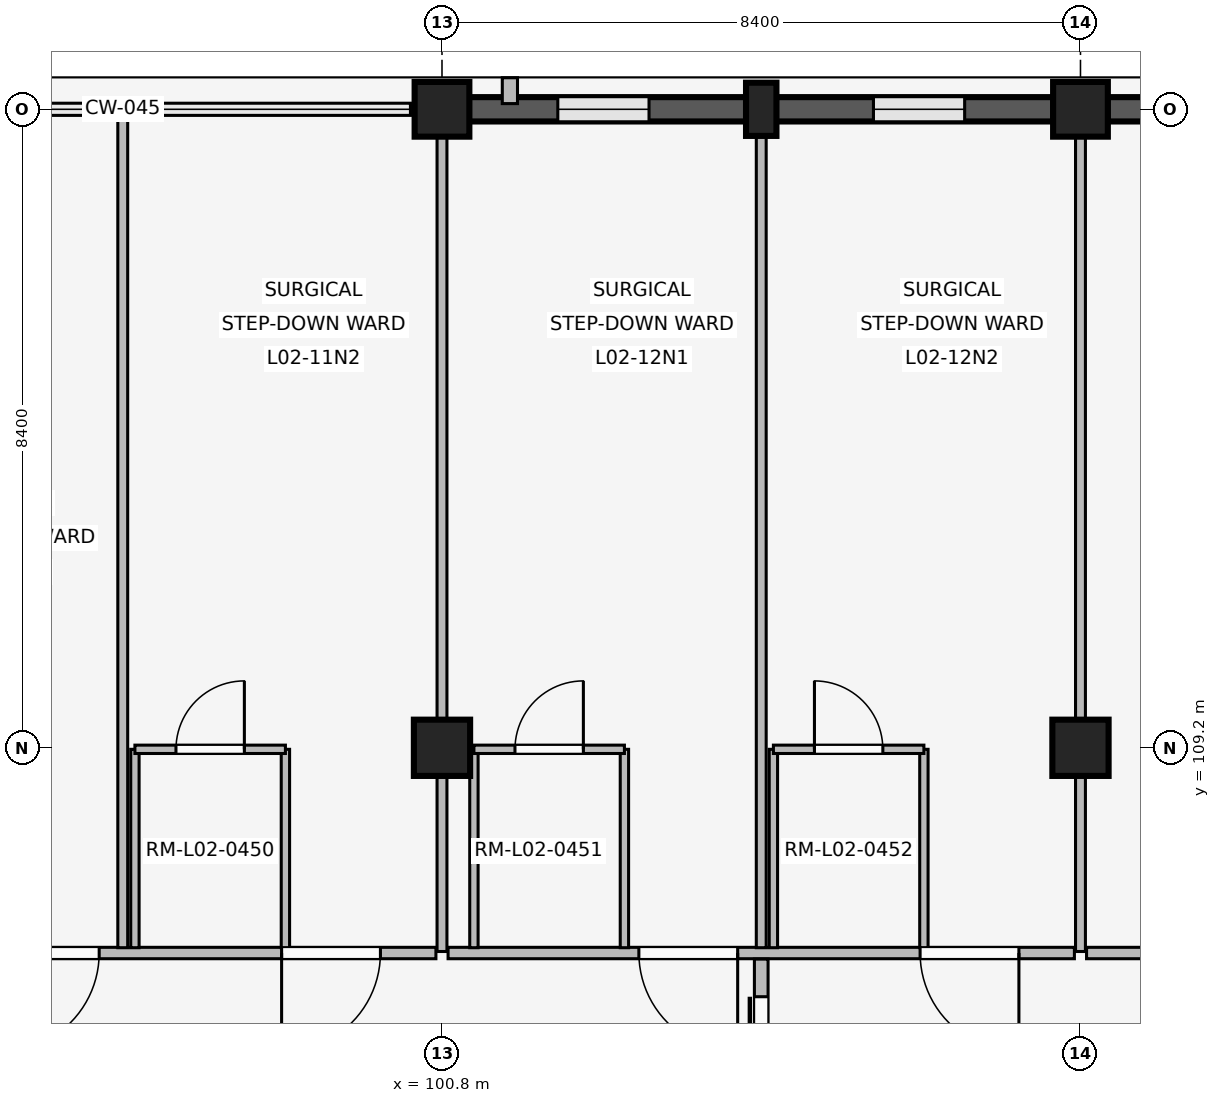
"""IFC4 building model, lengths in metres.
Left out: names, types, materials, properties, quantities, classifications, styles, units other than length and angle.
Written with IfcOpenShell. Run it as: python <this file> out.ifc"""

import sys

from ifc_helpers import new_model, si_unit, direction, frame, frame_2d, origin, origin_2d, place, context, subcontext, project, spatial, rectangle, extrude, element, fill, save


model = new_model("IFC4")
c1 = context("Model", 3, precision=1e-05, world=origin(), true_north=direction((0.0, 1.0)))
c2 = subcontext(c1, "Body", "Model", "MODEL_VIEW")
j1 = project(units=[si_unit("LENGTHUNIT", "METRE"), si_unit("PLANEANGLEUNIT", "RADIAN")], contexts=[c1])
p1 = place(None, origin())
s1 = spatial("IfcSite", under=j1, at=p1, CompositionType="ELEMENT")
p2 = place(p1, origin())
s2 = spatial("IfcBuilding", under=s1, at=p2, CompositionType="ELEMENT")
p3 = place(p2, frame((0.0, 0.0, 8.1)))
s3 = spatial("IfcBuildingStorey", under=s2, at=p3, CompositionType="ELEMENT", Elevation=8.1)
p4 = place(p3, frame((100.8, 109.2, 0.0), z_axis=(0.0, 0.0, 1.0), x_axis=(1.0, 0.0, 0.0)))
e1 = element("IfcColumn", 1, at=p4, inside=s3, PredefinedType="COLUMN", context=c2, shape_type="SweptSolid", body=[
    extrude(rectangle(XDim=0.74, YDim=0.74, at=origin_2d()), origin(), (0.0, 0.0, 1.0), 4.8),
])
p5 = place(p3, frame((100.8, 117.6, 0.0), z_axis=(0.0, 0.0, 1.0), x_axis=(1.0, 0.0, 0.0)))
e2 = element("IfcColumn", 2, at=p5, inside=s3, PredefinedType="COLUMN", context=c2, shape_type="SweptSolid", body=[
    extrude(rectangle(XDim=0.72, YDim=0.72, at=origin_2d()), origin(), (0.0, 0.0, 1.0), 4.8),
])
p6 = place(p3, frame((109.2, 109.2, 0.0), z_axis=(0.0, 0.0, 1.0), x_axis=(1.0, 0.0, 0.0)))
e3 = element("IfcColumn", 3, at=p6, inside=s3, PredefinedType="COLUMN", context=c2, shape_type="SweptSolid", body=[
    extrude(rectangle(XDim=0.74, YDim=0.74, at=origin_2d()), origin(), (0.0, 0.0, 1.0), 4.8),
])
p7 = place(p3, frame((109.2, 117.6, 0.0), z_axis=(0.0, 0.0, 1.0), x_axis=(1.0, 0.0, 0.0)))
e4 = element("IfcColumn", 4, at=p7, inside=s3, PredefinedType="COLUMN", context=c2, shape_type="SweptSolid", body=[
    extrude(rectangle(XDim=0.72, YDim=0.72, at=origin_2d()), origin(), (0.0, 0.0, 1.0), 4.8),
])
p8 = place(p3, frame((105.0, 117.6, 0.0), z_axis=(0.0, 0.0, 1.0), x_axis=(1.0, 0.0, 0.0)))
e5 = element("IfcColumn", 5, at=p8, inside=s3, PredefinedType="PILASTER", context=c2, shape_type="SweptSolid", body=[
    extrude(rectangle(XDim=0.4, YDim=0.7, at=origin_2d()), origin(), (0.0, 0.0, 1.0), 4.8),
])
p9 = place(p3, frame((101.155, 117.6, 0.0), z_axis=(0.0, 0.0, 1.0), x_axis=(1.0, 0.0, 0.0)))
e6 = element("IfcWall", 6, at=p9, inside=s3, PredefinedType="SOLIDWALL", context=c2, shape_type="SweptSolid", body=[
    extrude(rectangle(XDim=7.69, YDim=0.32, at=frame_2d((3.845, 0.0))), origin(), (0.0, 0.0, 1.0), 3.86),
])
p10 = place(p9, frame((1.169, 0.0, 0.85)))
e7 = element("IfcOpeningElement", 7, at=p10, cuts=e6, PredefinedType="OPENING", context=c2, shape_type="SweptSolid", body=[
    extrude(rectangle(XDim=1.2, YDim=1.55, at=frame_2d((0.6, 0.775))), frame((0.0, 0.17, 0.0), z_axis=(0.0, -1.0, 0.0), x_axis=(1.0, 0.0, 0.0)), (0.0, 0.0, 1.0), 0.34),
])
p11 = place(p9, frame((5.321, 0.0, 0.85)))
e8 = element("IfcOpeningElement", 8, at=p11, cuts=e6, PredefinedType="OPENING", context=c2, shape_type="SweptSolid", body=[
    extrude(rectangle(XDim=1.2, YDim=1.55, at=frame_2d((0.6, 0.775))), frame((0.0, 0.17, 0.0), z_axis=(0.0, -1.0, 0.0), x_axis=(1.0, 0.0, 0.0)), (0.0, 0.0, 1.0), 0.34),
])
p12 = place(p3, frame((101.693, 117.675, 0.0), z_axis=(0.0, 0.0, 1.0), x_axis=(0.0, 1.0, 0.0)))
e9 = element("IfcWall", 9, at=p12, inside=s3, PredefinedType="ELEMENTEDWALL", context=c2, shape_type="SweptSolid", body=[
    extrude(rectangle(XDim=0.34, YDim=0.2, at=frame_2d((0.17, 0.0))), origin(), (0.0, 0.0, 1.0), 3.84),
])
p13 = place(p3, frame((109.555, 117.6, 0.0), z_axis=(0.0, 0.0, 1.0), x_axis=(1.0, 0.0, 0.0)))
e10 = element("IfcWall", 10, at=p13, inside=s3, PredefinedType="SOLIDWALL", context=c2, shape_type="SweptSolid", body=[
    extrude(rectangle(XDim=7.69, YDim=0.32, at=frame_2d((3.845, 0.0))), origin(), (0.0, 0.0, 1.0), 3.86),
])
p14 = place(p13, frame((1.394, 0.0, 0.85)))
e11 = element("IfcOpeningElement", 11, at=p14, cuts=e10, PredefinedType="OPENING", context=c2, shape_type="SweptSolid", body=[
    extrude(rectangle(XDim=0.75, YDim=1.85, at=frame_2d((0.375, 0.925))), frame((0.0, 0.17, 0.0), z_axis=(0.0, -1.0, 0.0), x_axis=(1.0, 0.0, 0.0)), (0.0, 0.0, 1.0), 0.34),
])
p15 = place(p13, frame((5.546, 0.0, 0.85)))
e12 = element("IfcOpeningElement", 12, at=p15, cuts=e10, PredefinedType="OPENING", context=c2, shape_type="SweptSolid", body=[
    extrude(rectangle(XDim=0.75, YDim=1.85, at=frame_2d((0.375, 0.925))), frame((0.0, 0.17, 0.0), z_axis=(0.0, -1.0, 0.0), x_axis=(1.0, 0.0, 0.0)), (0.0, 0.0, 1.0), 0.34),
])
p16 = place(p3, frame((100.72, 106.5, 0.0), z_axis=(0.0, 0.0, 1.0), x_axis=(-1.0, 0.0, 0.0)))
e13 = element("IfcWall", 13, at=p16, inside=s3, PredefinedType="PARTITIONING", context=c2, shape_type="SweptSolid", body=[
    extrude(rectangle(XDim=7.96, YDim=0.15, at=frame_2d((3.98, 0.0))), origin(), (0.0, 0.0, 1.0), 3.84),
])
p17 = place(p16, frame((0.73, 0.0, 0.0)))
e14 = element("IfcOpeningElement", 14, at=p17, cuts=e13, PredefinedType="OPENING", context=c2, shape_type="SweptSolid", body=[
    extrude(rectangle(XDim=1.3, YDim=2.25, at=frame_2d((0.65, 1.125))), frame((0.0, 0.085, 0.0), z_axis=(0.0, -1.0, 0.0), x_axis=(1.0, 0.0, 0.0)), (0.0, 0.0, 1.0), 0.17),
])
p18 = place(p16, frame((4.43, 0.0, 0.0)))
e15 = element("IfcOpeningElement", 15, at=p18, cuts=e13, PredefinedType="OPENING", context=c2, shape_type="SweptSolid", body=[
    extrude(rectangle(XDim=1.3, YDim=2.25, at=frame_2d((0.65, 1.125))), frame((0.0, 0.085, 0.0), z_axis=(0.0, -1.0, 0.0), x_axis=(1.0, 0.0, 0.0)), (0.0, 0.0, 1.0), 0.17),
])
p19 = place(p3, frame((96.6, 106.57, 0.0), z_axis=(0.0, 0.0, 1.0), x_axis=(0.0, 1.0, 0.0)))
e16 = element("IfcWall", 16, at=p19, inside=s3, PredefinedType="PARTITIONING", context=c2, shape_type="SweptSolid", body=[
    extrude(rectangle(XDim=10.93, YDim=0.13, at=frame_2d((5.465, 0.0))), origin(), (0.0, 0.0, 1.0), 3.84),
])
for number, where, z_axis, x_axis in (
    (17, (96.76, 106.57, 0.0), (0.0, 0.0, 1.0), (0.0, 1.0, 0.0)),
    (18, (98.74, 106.57, 0.0), (0.0, 0.0, 1.0), (0.0, 1.0, 0.0)),
):
    element("IfcWall", number, at=place(p3, frame(where, z_axis=z_axis, x_axis=x_axis)), inside=s3, PredefinedType="PARTITIONING", context=c2, shape_type="SweptSolid", body=[
        extrude(rectangle(XDim=2.61, YDim=0.11, at=frame_2d((1.305, 0.0))), origin(), (0.0, 0.0, 1.0), 3.84),
    ])
p20 = place(p3, frame((96.76, 109.18, 0.0), z_axis=(0.0, 0.0, 1.0), x_axis=(1.0, 0.0, 0.0)))
e19 = element("IfcWall", 19, at=p20, inside=s3, PredefinedType="PARTITIONING", context=c2, shape_type="SweptSolid", body=[
    extrude(rectangle(XDim=1.98, YDim=0.11, at=frame_2d((0.99, 0.0))), origin(), (0.0, 0.0, 1.0), 3.84),
])
p21 = place(p20, frame((0.54, 0.0, 0.0)))
e20 = element("IfcOpeningElement", 20, at=p21, cuts=e19, PredefinedType="OPENING", context=c2, shape_type="SweptSolid", body=[
    extrude(rectangle(XDim=0.9, YDim=2.1, at=frame_2d((0.45, 1.05))), frame((0.0, 0.065, 0.0), z_axis=(0.0, -1.0, 0.0), x_axis=(1.0, 0.0, 0.0)), (0.0, 0.0, 1.0), 0.13),
])
p22 = place(p3, frame((100.8, 106.52, 0.0), z_axis=(0.0, 0.0, 1.0), x_axis=(0.0, 1.0, 0.0)))
e21 = element("IfcWall", 21, at=p22, inside=s3, PredefinedType="PARTITIONING", context=c2, shape_type="SweptSolid", body=[
    extrude(rectangle(XDim=10.94, YDim=0.13, at=frame_2d((5.47, 0.0))), origin(), (0.0, 0.0, 1.0), 3.84),
])
p23 = place(p3, frame((109.12, 106.5, 0.0), z_axis=(0.0, 0.0, 1.0), x_axis=(-1.0, 0.0, 0.0)))
e22 = element("IfcWall", 22, at=p23, inside=s3, PredefinedType="PARTITIONING", context=c2, shape_type="SweptSolid", body=[
    extrude(rectangle(XDim=8.24, YDim=0.15, at=frame_2d((4.12, 0.0))), origin(), (0.0, 0.0, 1.0), 3.84),
])
p24 = place(p23, frame((0.73, 0.0, 0.0)))
e23 = element("IfcOpeningElement", 23, at=p24, cuts=e22, PredefinedType="OPENING", context=c2, shape_type="SweptSolid", body=[
    extrude(rectangle(XDim=1.3, YDim=2.25, at=frame_2d((0.65, 1.125))), frame((0.0, 0.085, 0.0), z_axis=(0.0, -1.0, 0.0), x_axis=(1.0, 0.0, 0.0)), (0.0, 0.0, 1.0), 0.17),
])
p25 = place(p23, frame((4.43, 0.0, 0.0)))
e24 = element("IfcOpeningElement", 24, at=p25, cuts=e22, PredefinedType="OPENING", context=c2, shape_type="SweptSolid", body=[
    extrude(rectangle(XDim=1.3, YDim=2.25, at=frame_2d((0.65, 1.125))), frame((0.0, 0.085, 0.0), z_axis=(0.0, -1.0, 0.0), x_axis=(1.0, 0.0, 0.0)), (0.0, 0.0, 1.0), 0.17),
])
p26 = place(p3, frame((105.0, 106.57, 0.0), z_axis=(0.0, 0.0, 1.0), x_axis=(0.0, 1.0, 0.0)))
e25 = element("IfcWall", 25, at=p26, inside=s3, PredefinedType="PARTITIONING", context=c2, shape_type="SweptSolid", body=[
    extrude(rectangle(XDim=10.93, YDim=0.13, at=frame_2d((5.465, 0.0))), origin(), (0.0, 0.0, 1.0), 3.84),
])
for number, where, z_axis, x_axis in (
    (26, (101.22, 106.57, 0.0), (0.0, 0.0, 1.0), (0.0, 1.0, 0.0)),
    (27, (103.2, 106.57, 0.0), (0.0, 0.0, 1.0), (0.0, 1.0, 0.0)),
):
    element("IfcWall", number, at=place(p3, frame(where, z_axis=z_axis, x_axis=x_axis)), inside=s3, PredefinedType="PARTITIONING", context=c2, shape_type="SweptSolid", body=[
        extrude(rectangle(XDim=2.61, YDim=0.11, at=frame_2d((1.305, 0.0))), origin(), (0.0, 0.0, 1.0), 3.84),
    ])
p27 = place(p3, frame((101.22, 109.18, 0.0), z_axis=(0.0, 0.0, 1.0), x_axis=(1.0, 0.0, 0.0)))
e28 = element("IfcWall", 28, at=p27, inside=s3, PredefinedType="PARTITIONING", context=c2, shape_type="SweptSolid", body=[
    extrude(rectangle(XDim=1.98, YDim=0.11, at=frame_2d((0.99, 0.0))), origin(), (0.0, 0.0, 1.0), 3.84),
])
p28 = place(p27, frame((0.54, 0.0, 0.0)))
e29 = element("IfcOpeningElement", 29, at=p28, cuts=e28, PredefinedType="OPENING", context=c2, shape_type="SweptSolid", body=[
    extrude(rectangle(XDim=0.9, YDim=2.1, at=frame_2d((0.45, 1.05))), frame((0.0, 0.065, 0.0), z_axis=(0.0, -1.0, 0.0), x_axis=(1.0, 0.0, 0.0)), (0.0, 0.0, 1.0), 0.13),
])
for number, where, z_axis, x_axis in (
    (30, (105.16, 106.57, 0.0), (0.0, 0.0, 1.0), (0.0, 1.0, 0.0)),
    (31, (107.14, 106.57, 0.0), (0.0, 0.0, 1.0), (0.0, 1.0, 0.0)),
):
    element("IfcWall", number, at=place(p3, frame(where, z_axis=z_axis, x_axis=x_axis)), inside=s3, PredefinedType="PARTITIONING", context=c2, shape_type="SweptSolid", body=[
        extrude(rectangle(XDim=2.61, YDim=0.11, at=frame_2d((1.305, 0.0))), origin(), (0.0, 0.0, 1.0), 3.84),
    ])
p29 = place(p3, frame((105.16, 109.18, 0.0), z_axis=(0.0, 0.0, 1.0), x_axis=(1.0, 0.0, 0.0)))
e32 = element("IfcWall", 32, at=p29, inside=s3, PredefinedType="PARTITIONING", context=c2, shape_type="SweptSolid", body=[
    extrude(rectangle(XDim=1.98, YDim=0.11, at=frame_2d((0.99, 0.0))), origin(), (0.0, 0.0, 1.0), 3.84),
])
p30 = place(p29, frame((0.54, 0.0, 0.0)))
e33 = element("IfcOpeningElement", 33, at=p30, cuts=e32, PredefinedType="OPENING", context=c2, shape_type="SweptSolid", body=[
    extrude(rectangle(XDim=0.9, YDim=2.1, at=frame_2d((0.45, 1.05))), frame((0.0, 0.065, 0.0), z_axis=(0.0, -1.0, 0.0), x_axis=(1.0, 0.0, 0.0)), (0.0, 0.0, 1.0), 0.13),
])
p31 = place(p3, frame((105.0, 103.58, 0.0), z_axis=(0.0, 0.0, 1.0), x_axis=(0.0, 1.0, 0.0)))
e34 = element("IfcWall", 34, at=p31, inside=s3, PredefinedType="PARTITIONING", context=c2, shape_type="SweptSolid", body=[
    extrude(rectangle(XDim=2.84, YDim=0.18, at=frame_2d((1.42, 0.0))), origin(), (0.0, 0.0, 1.0), 3.84),
])
p32 = place(p31, frame((0.495, 0.0, 0.0)))
e35 = element("IfcOpeningElement", 35, at=p32, cuts=e34, PredefinedType="OPENING", context=c2, shape_type="SweptSolid", body=[
    extrude(rectangle(XDim=1.85, YDim=2.3, at=frame_2d((0.925, 1.15))), frame((0.0, 0.1, 0.0), z_axis=(0.0, -1.0, 0.0), x_axis=(1.0, 0.0, 0.0)), (0.0, 0.0, 1.0), 0.2),
])
p33 = place(p3, frame((109.2, 106.52, 0.0), z_axis=(0.0, 0.0, 1.0), x_axis=(0.0, 1.0, 0.0)))
e36 = element("IfcWall", 36, at=p33, inside=s3, PredefinedType="PARTITIONING", context=c2, shape_type="SweptSolid", body=[
    extrude(rectangle(XDim=10.94, YDim=0.13, at=frame_2d((5.47, 0.0))), origin(), (0.0, 0.0, 1.0), 3.84),
])
p34 = place(p3, frame((117.52, 106.5, 0.0), z_axis=(0.0, 0.0, 1.0), x_axis=(-1.0, 0.0, 0.0)))
e37 = element("IfcWall", 37, at=p34, inside=s3, PredefinedType="PARTITIONING", context=c2, shape_type="SweptSolid", body=[
    extrude(rectangle(XDim=8.24, YDim=0.15, at=frame_2d((4.12, 0.0))), origin(), (0.0, 0.0, 1.0), 3.84),
])
p35 = place(p34, frame((3.37, 0.0, 0.0)))
e38 = element("IfcOpeningElement", 38, at=p35, cuts=e37, PredefinedType="OPENING", context=c2, shape_type="SweptSolid", body=[
    extrude(rectangle(XDim=1.5, YDim=2.3, at=frame_2d((0.75, 1.15))), frame((0.0, 0.085, 0.0), z_axis=(0.0, -1.0, 0.0), x_axis=(1.0, 0.0, 0.0)), (0.0, 0.0, 1.0), 0.17),
])
p36 = place(p10, origin())
e39 = element("IfcWindow", 39, at=p36, inside=s3, PartitioningType="SINGLE_PANEL", PredefinedType="WINDOW", context=c2, shape_type="SweptSolid", body=[
    extrude(rectangle(XDim=1.2, YDim=1.55, at=frame_2d((0.6, 0.775))), frame((0.0, 0.03, 0.0), z_axis=(0.0, -1.0, 0.0), x_axis=(1.0, 0.0, 0.0)), (0.0, 0.0, 1.0), 0.06),
])
fill(e7, e39)
p37 = place(p11, origin())
e40 = element("IfcWindow", 40, at=p37, inside=s3, PartitioningType="SINGLE_PANEL", PredefinedType="WINDOW", context=c2, shape_type="SweptSolid", body=[
    extrude(rectangle(XDim=1.2, YDim=1.55, at=frame_2d((0.6, 0.775))), frame((0.0, 0.03, 0.0), z_axis=(0.0, -1.0, 0.0), x_axis=(1.0, 0.0, 0.0)), (0.0, 0.0, 1.0), 0.06),
])
fill(e8, e40)
p38 = place(p17, origin())
e41 = element("IfcDoor", 41, at=p38, inside=s3, OperationType="SINGLE_SWING_RIGHT", PredefinedType="DOOR", context=c2, shape_type="SweptSolid", body=[
    extrude(rectangle(XDim=1.3, YDim=2.25, at=frame_2d((0.65, 1.125))), frame((0.0, 0.025, 0.0), z_axis=(0.0, -1.0, 0.0), x_axis=(1.0, 0.0, 0.0)), (0.0, 0.0, 1.0), 0.05),
])
fill(e14, e41)
p39 = place(p18, origin())
e42 = element("IfcDoor", 42, at=p39, inside=s3, OperationType="SINGLE_SWING_RIGHT", PredefinedType="DOOR", context=c2, shape_type="SweptSolid", body=[
    extrude(rectangle(XDim=1.3, YDim=2.25, at=frame_2d((0.65, 1.125))), frame((0.0, 0.025, 0.0), z_axis=(0.0, -1.0, 0.0), x_axis=(1.0, 0.0, 0.0)), (0.0, 0.0, 1.0), 0.05),
])
fill(e15, e42)
p40 = place(p21, origin())
e43 = element("IfcDoor", 43, at=p40, inside=s3, OperationType="SINGLE_SWING_RIGHT", PredefinedType="DOOR", context=c2, shape_type="SweptSolid", body=[
    extrude(rectangle(XDim=0.9, YDim=2.1, at=frame_2d((0.45, 1.05))), frame((0.0, 0.025, 0.0), z_axis=(0.0, -1.0, 0.0), x_axis=(1.0, 0.0, 0.0)), (0.0, 0.0, 1.0), 0.05),
])
fill(e20, e43)
p41 = place(p24, origin())
e44 = element("IfcDoor", 44, at=p41, inside=s3, OperationType="SINGLE_SWING_LEFT", PredefinedType="DOOR", context=c2, shape_type="SweptSolid", body=[
    extrude(rectangle(XDim=1.3, YDim=2.25, at=frame_2d((0.65, 1.125))), frame((0.0, 0.025, 0.0), z_axis=(0.0, -1.0, 0.0), x_axis=(1.0, 0.0, 0.0)), (0.0, 0.0, 1.0), 0.05),
])
fill(e23, e44)
p42 = place(p25, origin())
e45 = element("IfcDoor", 45, at=p42, inside=s3, OperationType="SINGLE_SWING_LEFT", PredefinedType="DOOR", context=c2, shape_type="SweptSolid", body=[
    extrude(rectangle(XDim=1.3, YDim=2.25, at=frame_2d((0.65, 1.125))), frame((0.0, 0.025, 0.0), z_axis=(0.0, -1.0, 0.0), x_axis=(1.0, 0.0, 0.0)), (0.0, 0.0, 1.0), 0.05),
])
fill(e24, e45)
p43 = place(p28, origin())
e46 = element("IfcDoor", 46, at=p43, inside=s3, OperationType="SINGLE_SWING_RIGHT", PredefinedType="DOOR", context=c2, shape_type="SweptSolid", body=[
    extrude(rectangle(XDim=0.9, YDim=2.1, at=frame_2d((0.45, 1.05))), frame((0.0, 0.025, 0.0), z_axis=(0.0, -1.0, 0.0), x_axis=(1.0, 0.0, 0.0)), (0.0, 0.0, 1.0), 0.05),
])
fill(e29, e46)
p44 = place(p30, origin())
e47 = element("IfcDoor", 47, at=p44, inside=s3, OperationType="SINGLE_SWING_LEFT", PredefinedType="DOOR", context=c2, shape_type="SweptSolid", body=[
    extrude(rectangle(XDim=0.9, YDim=2.1, at=frame_2d((0.45, 1.05))), frame((0.0, 0.025, 0.0), z_axis=(0.0, -1.0, 0.0), x_axis=(1.0, 0.0, 0.0)), (0.0, 0.0, 1.0), 0.05),
])
fill(e33, e47)
p45 = place(p32, origin())
e48 = element("IfcDoor", 48, at=p45, inside=s3, OperationType="SLIDING_TO_LEFT", PredefinedType="DOOR", context=c2, shape_type="SweptSolid", body=[
    extrude(rectangle(XDim=1.85, YDim=2.3, at=frame_2d((0.925, 1.15))), frame((0.0, 0.025, 0.0), z_axis=(0.0, -1.0, 0.0), x_axis=(1.0, 0.0, 0.0)), (0.0, 0.0, 1.0), 0.05),
])
fill(e35, e48)
save(model, sys.argv[1])
